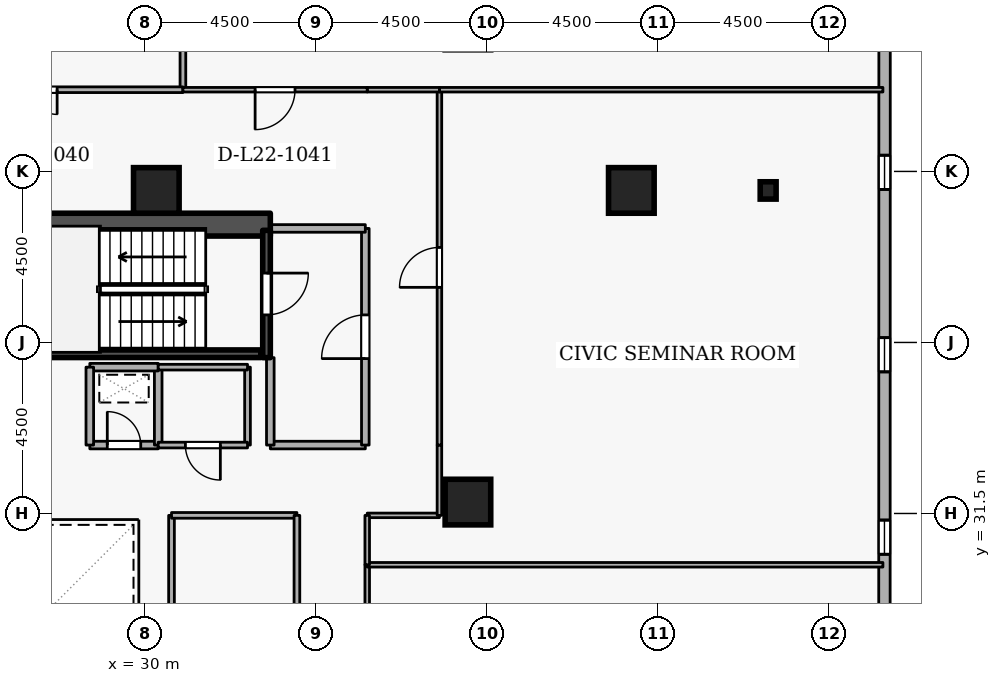
"""IFC4 building model, lengths in metres.
Left out: names, types, materials, properties, quantities, classifications, styles, units other than length and angle.
Written with IfcOpenShell. Run it as: python <this file> out.ifc"""

import sys

from ifc_helpers import new_model, si_unit, direction, frame, frame_2d, origin, origin_2d, place, context, subcontext, project, spatial, rectangle, i_section, extrude, element, fill, save


model = new_model("IFC4")
c1 = context("Model", 3, precision=1e-05, world=origin(), true_north=direction((0.0, 1.0)))
c2 = subcontext(c1, "Body", "Model", "MODEL_VIEW")
j1 = project(units=[si_unit("LENGTHUNIT", "METRE"), si_unit("PLANEANGLEUNIT", "RADIAN")], contexts=[c1])
p1 = place(None, origin())
s1 = spatial("IfcSite", under=j1, at=p1, CompositionType="ELEMENT")
p2 = place(p1, origin())
s2 = spatial("IfcBuilding", under=s1, at=p2, CompositionType="ELEMENT")
p3 = place(p2, frame((0.0, 0.0, 87.3)))
s3 = spatial("IfcBuildingStorey", under=s2, at=p3, CompositionType="ELEMENT", Elevation=87.3)
p4 = place(p3, frame((17.7, 39.1, 0.0), z_axis=(0.0, 0.0, 1.0), x_axis=(1.0, 0.0, 0.0)))
e1 = element("IfcWall", 1, at=p4, inside=s3, PredefinedType="SHEAR", context=c2, shape_type="SweptSolid", body=[
    extrude(rectangle(XDim=15.6, YDim=0.6, at=frame_2d((7.8, 0.0))), origin(), (0.0, 0.0, 1.0), 3.6),
])
for number, where, z_axis, x_axis in (
    (2, (42.8, 40.0, 0.0), (0.0, 0.0, 1.0), (1.0, 0.0, 0.0)),
    (3, (38.5, 31.8, 0.0), (0.0, 0.0, 1.0), (1.0, 0.0, 0.0)),
    (4, (30.3, 40.0, 0.0), (0.0, 0.0, 1.0), (1.0, 0.0, 0.0)),
):
    element("IfcColumn", number, at=place(p3, frame(where, z_axis=z_axis, x_axis=x_axis)), inside=s3, PredefinedType="COLUMN", context=c2, shape_type="SweptSolid", body=[
        extrude(rectangle(XDim=1.2, YDim=1.2, at=origin_2d()), origin(), (0.0, 0.0, 1.0), 3.6),
    ])
p5 = place(p3, frame((46.4, 40.0, 0.0), z_axis=(0.0, 0.0, 1.0), x_axis=(1.0, 0.0, 0.0)))
e5 = element("IfcColumn", 5, at=p5, inside=s3, PredefinedType="COLUMN", context=c2, shape_type="SweptSolid", body=[
    extrude(i_section(OverallWidth=0.418, OverallDepth=0.456, WebThickness=0.042, FlangeThickness=0.067, FilletRadius=0.015, at=origin_2d()), origin(), (0.0, 0.0, 1.0), 3.6),
])
p6 = place(p3, frame((49.456, 14.226, 0.0), z_axis=(0.0, 0.0, 1.0), x_axis=(0.000243032466, 0.999999970468, 0.0)))
e6 = element("IfcWall", 6, at=p6, inside=s3, PredefinedType="STANDARD", context=c2, shape_type="SweptSolid", body=[
    extrude(rectangle(XDim=34.155, YDim=0.3, at=frame_2d((17.078, 0.0))), origin(), (0.0, 0.0, 1.0), 2.7),
])
p7 = place(p6, frame((1.8, 0.0, 0.72)))
e7 = element("IfcOpeningElement", 7, at=p7, cuts=e6, PredefinedType="OPENING", context=c2, shape_type="SweptSolid", body=[
    extrude(rectangle(XDim=0.9, YDim=1.75, at=frame_2d((0.45, 0.875))), frame((0.0, 0.16, 0.0), z_axis=(0.0, -1.0, 0.0), x_axis=(1.0, 0.0, 0.0)), (0.0, 0.0, 1.0), 0.32),
])
p8 = place(p6, frame((6.6, 0.0, 0.72)))
e8 = element("IfcOpeningElement", 8, at=p8, cuts=e6, PredefinedType="OPENING", context=c2, shape_type="SweptSolid", body=[
    extrude(rectangle(XDim=0.9, YDim=1.75, at=frame_2d((0.45, 0.875))), frame((0.0, 0.16, 0.0), z_axis=(0.0, -1.0, 0.0), x_axis=(1.0, 0.0, 0.0)), (0.0, 0.0, 1.0), 0.32),
])
p9 = place(p6, frame((11.4, 0.0, 0.72)))
e9 = element("IfcOpeningElement", 9, at=p9, cuts=e6, PredefinedType="OPENING", context=c2, shape_type="SweptSolid", body=[
    extrude(rectangle(XDim=0.9, YDim=1.75, at=frame_2d((0.45, 0.875))), frame((0.0, 0.16, 0.0), z_axis=(0.0, -1.0, 0.0), x_axis=(1.0, 0.0, 0.0)), (0.0, 0.0, 1.0), 0.32),
])
p10 = place(p6, frame((16.2, 0.0, 0.72)))
e10 = element("IfcOpeningElement", 10, at=p10, cuts=e6, PredefinedType="OPENING", context=c2, shape_type="SweptSolid", body=[
    extrude(rectangle(XDim=0.9, YDim=1.75, at=frame_2d((0.45, 0.875))), frame((0.0, 0.16, 0.0), z_axis=(0.0, -1.0, 0.0), x_axis=(1.0, 0.0, 0.0)), (0.0, 0.0, 1.0), 0.32),
])
p11 = place(p6, frame((21.0, 0.0, 0.72)))
e11 = element("IfcOpeningElement", 11, at=p11, cuts=e6, PredefinedType="OPENING", context=c2, shape_type="SweptSolid", body=[
    extrude(rectangle(XDim=0.9, YDim=1.75, at=frame_2d((0.45, 0.875))), frame((0.0, 0.16, 0.0), z_axis=(0.0, -1.0, 0.0), x_axis=(1.0, 0.0, 0.0)), (0.0, 0.0, 1.0), 0.32),
])
p12 = place(p6, frame((25.8, 0.0, 0.72)))
e12 = element("IfcOpeningElement", 12, at=p12, cuts=e6, PredefinedType="OPENING", context=c2, shape_type="SweptSolid", body=[
    extrude(rectangle(XDim=0.9, YDim=1.75, at=frame_2d((0.45, 0.875))), frame((0.0, 0.16, 0.0), z_axis=(0.0, -1.0, 0.0), x_axis=(1.0, 0.0, 0.0)), (0.0, 0.0, 1.0), 0.32),
])
p13 = place(p6, frame((30.6, 0.0, 0.72)))
e13 = element("IfcOpeningElement", 13, at=p13, cuts=e6, PredefinedType="OPENING", context=c2, shape_type="SweptSolid", body=[
    extrude(rectangle(XDim=0.9, YDim=1.75, at=frame_2d((0.45, 0.875))), frame((0.0, 0.16, 0.0), z_axis=(0.0, -1.0, 0.0), x_axis=(1.0, 0.0, 0.0)), (0.0, 0.0, 1.0), 0.32),
])
p14 = place(p3, frame((33.2, 38.95, 0.0), z_axis=(0.0, 0.0, 1.0), x_axis=(0.0, -1.0, 0.0)))
e14 = element("IfcWall", 14, at=p14, inside=s3, PredefinedType="SHEAR", context=c2, shape_type="SweptSolid", body=[
    extrude(rectangle(XDim=3.35, YDim=0.2, at=frame_2d((1.675, 0.0))), origin(), (0.0, 0.0, 1.0), 3.6),
])
p15 = place(p14, frame((1.125, 0.0, 0.0)))
e15 = element("IfcOpeningElement", 15, at=p15, cuts=e14, PredefinedType="OPENING", context=c2, shape_type="SweptSolid", body=[
    extrude(rectangle(XDim=1.1, YDim=2.1, at=frame_2d((0.55, 1.05))), frame((0.0, 0.11, 0.0), z_axis=(0.0, -1.0, 0.0), x_axis=(1.0, 0.0, 0.0)), (0.0, 0.0, 1.0), 0.22),
])
p16 = place(p3, frame((25.95, 35.703, 0.0), z_axis=(0.0, 0.0, 1.0), x_axis=(1.0, 0.0, 0.0)))
e16 = element("IfcWall", 16, at=p16, inside=s3, PredefinedType="SHEAR", context=c2, shape_type="SweptSolid", body=[
    extrude(rectangle(XDim=7.1, YDim=0.2, at=frame_2d((3.55, 0.0))), origin(), (0.0, 0.0, 1.0), 3.6),
])
p17 = place(p3, frame((33.3, 33.3, 0.0), z_axis=(0.0, 0.0, 1.0), x_axis=(1.0, 0.0, 0.0)))
e17 = element("IfcWall", 17, at=p17, inside=s3, PredefinedType="STANDARD", context=c2, shape_type="SweptSolid", body=[
    extrude(rectangle(XDim=2.5, YDim=0.2, at=frame_2d((1.25, 0.0))), origin(), (0.0, 0.0, 1.0), 3.34),
])
p18 = place(p3, frame((35.8, 33.3, 0.0), z_axis=(0.0, 0.0, 1.0), x_axis=(0.0, 1.0, 0.0)))
e18 = element("IfcWall", 18, at=p18, inside=s3, PredefinedType="STANDARD", context=c2, shape_type="SweptSolid", body=[
    extrude(rectangle(XDim=5.7, YDim=0.2, at=frame_2d((2.85, 0.0))), origin(), (0.0, 0.0, 1.0), 3.34),
])
p19 = place(p18, frame((2.275, 0.0, 0.0)))
e19 = element("IfcOpeningElement", 19, at=p19, cuts=e18, PredefinedType="OPENING", context=c2, shape_type="SweptSolid", body=[
    extrude(rectangle(XDim=1.15, YDim=2.1, at=frame_2d((0.575, 1.05))), frame((0.0, 0.11, 0.0), z_axis=(0.0, -1.0, 0.0), x_axis=(1.0, 0.0, 0.0)), (0.0, 0.0, 1.0), 0.22),
])
p20 = place(p3, frame((35.8, 39.0, 0.0), z_axis=(0.0, 0.0, 1.0), x_axis=(-1.0, 0.0, 0.0)))
e20 = element("IfcWall", 20, at=p20, inside=s3, PredefinedType="STANDARD", context=c2, shape_type="SweptSolid", body=[
    extrude(rectangle(XDim=2.5, YDim=0.2, at=frame_2d((1.25, 0.0))), origin(), (0.0, 0.0, 1.0), 3.34),
])
p21 = place(p3, frame((33.3, 35.6, 0.0), z_axis=(0.0, 0.0, 1.0), x_axis=(0.0, -1.0, 0.0)))
e21 = element("IfcWall", 21, at=p21, inside=s3, PredefinedType="STANDARD", context=c2, shape_type="SweptSolid", body=[
    extrude(rectangle(XDim=2.3, YDim=0.2, at=frame_2d((1.15, 0.0))), origin(), (0.0, 0.0, 1.0), 2.545),
])
p22 = place(p3, frame((28.55, 33.3, 0.0), z_axis=(0.0, 0.0, 1.0), x_axis=(1.0, 0.0, 0.0)))
e22 = element("IfcWall", 22, at=p22, inside=s3, PredefinedType="STANDARD", context=c2, shape_type="SweptSolid", body=[
    extrude(rectangle(XDim=1.8, YDim=0.2, at=frame_2d((0.9, 0.0))), origin(), (0.0, 0.0, 1.0), 3.34),
])
p23 = place(p22, frame((0.46, 0.0, 0.0)))
e23 = element("IfcOpeningElement", 23, at=p23, cuts=e22, PredefinedType="OPENING", context=c2, shape_type="SweptSolid", body=[
    extrude(rectangle(XDim=0.88, YDim=2.04, at=frame_2d((0.44, 1.02))), frame((0.0, 0.11, 0.0), z_axis=(0.0, -1.0, 0.0), x_axis=(1.0, 0.0, 0.0)), (0.0, 0.0, 1.0), 0.22),
])
p24 = place(p3, frame((30.35, 33.3, 0.0), z_axis=(0.0, 0.0, 1.0), x_axis=(0.0, 1.0, 0.0)))
e24 = element("IfcWall", 24, at=p24, inside=s3, PredefinedType="STANDARD", context=c2, shape_type="SweptSolid", body=[
    extrude(rectangle(XDim=2.05, YDim=0.2, at=frame_2d((1.025, 0.0))), origin(), (0.0, 0.0, 1.0), 3.34),
])
p25 = place(p3, frame((30.35, 35.35, 0.0), z_axis=(0.0, 0.0, 1.0), x_axis=(-1.0, 0.0, 0.0)))
e25 = element("IfcWall", 25, at=p25, inside=s3, PredefinedType="STANDARD", context=c2, shape_type="SweptSolid", body=[
    extrude(rectangle(XDim=1.8, YDim=0.2, at=frame_2d((0.9, 0.0))), origin(), (0.0, 0.0, 1.0), 3.34),
])
p26 = place(p3, frame((28.55, 35.35, 0.0), z_axis=(0.0, 0.0, 1.0), x_axis=(0.0, -1.0, 0.0)))
e26 = element("IfcWall", 26, at=p26, inside=s3, PredefinedType="STANDARD", context=c2, shape_type="SweptSolid", body=[
    extrude(rectangle(XDim=2.05, YDim=0.2, at=frame_2d((1.025, 0.0))), origin(), (0.0, 0.0, 1.0), 3.34),
])
p27 = place(p3, frame((32.7, 35.35, 0.0), z_axis=(0.0, 0.0, 1.0), x_axis=(0.0, -1.0, 0.0)))
e27 = element("IfcWall", 27, at=p27, inside=s3, PredefinedType="PARTITIONING", context=c2, shape_type="SweptSolid", body=[
    extrude(rectangle(XDim=2.05, YDim=0.15, at=frame_2d((1.025, 0.0))), origin(), (0.0, 0.0, 1.0), 2.545),
])
p28 = place(p3, frame((32.7, 33.3, 0.0), z_axis=(0.0, 0.0, 1.0), x_axis=(-1.0, 0.0, 0.0)))
e28 = element("IfcWall", 28, at=p28, inside=s3, PredefinedType="PARTITIONING", context=c2, shape_type="SweptSolid", body=[
    extrude(rectangle(XDim=2.35, YDim=0.15, at=frame_2d((1.175, 0.0))), origin(), (0.0, 0.0, 1.0), 3.34),
])
p29 = place(p28, frame((0.715, 0.0, 0.0)))
e29 = element("IfcOpeningElement", 29, at=p29, cuts=e28, PredefinedType="OPENING", context=c2, shape_type="SweptSolid", body=[
    extrude(rectangle(XDim=0.92, YDim=2.08, at=frame_2d((0.46, 1.04))), frame((0.0, 0.085, 0.0), z_axis=(0.0, -1.0, 0.0), x_axis=(1.0, 0.0, 0.0)), (0.0, 0.0, 1.0), 0.17),
])
p30 = place(p3, frame((30.35, 35.35, 0.0), z_axis=(0.0, 0.0, 1.0), x_axis=(1.0, 0.0, 0.0)))
e30 = element("IfcWall", 30, at=p30, inside=s3, PredefinedType="PARTITIONING", context=c2, shape_type="SweptSolid", body=[
    extrude(rectangle(XDim=2.35, YDim=0.15, at=frame_2d((1.175, 0.0))), origin(), (0.0, 0.0, 1.0), 3.34),
])
p31 = place(p3, frame((35.85, 27.0, 0.0), z_axis=(0.0, 0.0, 1.0), x_axis=(0.0, 1.0, 0.0)))
e31 = element("IfcWall", 31, at=p31, inside=s3, PredefinedType="PARTITIONING", context=c2, shape_type="SweptSolid", body=[
    extrude(rectangle(XDim=3.15, YDim=0.12, at=frame_2d((1.575, 0.0))), origin(), (0.0, 0.0, 1.0), 3.34),
])
p32 = place(p31, frame((1.1, 0.0, 0.0)))
e32 = element("IfcOpeningElement", 32, at=p32, cuts=e31, PredefinedType="OPENING", context=c2, shape_type="SweptSolid", body=[
    extrude(rectangle(XDim=0.95, YDim=2.1, at=frame_2d((0.475, 1.05))), frame((0.0, 0.07, 0.0), z_axis=(0.0, -1.0, 0.0), x_axis=(1.0, 0.0, 0.0)), (0.0, 0.0, 1.0), 0.14),
])
p33 = place(p3, frame((35.85, 30.15, 0.0), z_axis=(0.0, 0.0, 1.0), x_axis=(1.0, 0.0, 0.0)))
e33 = element("IfcWall", 33, at=p33, inside=s3, PredefinedType="PARTITIONING", context=c2, shape_type="SweptSolid", body=[
    extrude(rectangle(XDim=13.57, YDim=0.12, at=frame_2d((6.785, 0.0))), origin(), (0.0, 0.0, 1.0), 3.34),
])
p34 = place(p3, frame((35.85, 31.45, 0.0), z_axis=(0.0, 0.0, 1.0), x_axis=(1.0, 0.0, 0.0)))
e34 = element("IfcWall", 34, at=p34, inside=s3, PredefinedType="PARTITIONING", context=c2, shape_type="SweptSolid", body=[
    extrude(rectangle(XDim=1.9, YDim=0.12, at=frame_2d((0.95, 0.0))), origin(), (0.0, 0.0, 1.0), 3.34),
])
p35 = place(p3, frame((37.75, 31.45, 0.0), z_axis=(0.0, 0.0, 1.0), x_axis=(0.0, 1.0, 0.0)))
e35 = element("IfcWall", 35, at=p35, inside=s3, PredefinedType="PARTITIONING", context=c2, shape_type="SweptSolid", body=[
    extrude(rectangle(XDim=1.85, YDim=0.12, at=frame_2d((0.925, 0.0))), origin(), (0.0, 0.0, 1.0), 3.34),
])
p36 = place(p3, frame((37.75, 33.3, 0.0), z_axis=(0.0, 0.0, 1.0), x_axis=(0.0, 1.0, 0.0)))
e36 = element("IfcWall", 36, at=p36, inside=s3, PredefinedType="PARTITIONING", context=c2, shape_type="SweptSolid", body=[
    extrude(rectangle(XDim=9.35, YDim=0.12, at=frame_2d((4.675, 0.0))), origin(), (0.0, 0.0, 1.0), 3.34),
])
p37 = place(p36, frame((4.15, 0.0, 0.0)))
e37 = element("IfcOpeningElement", 37, at=p37, cuts=e36, PredefinedType="OPENING", context=c2, shape_type="SweptSolid", body=[
    extrude(rectangle(XDim=1.05, YDim=2.1, at=frame_2d((0.525, 1.05))), frame((0.0, 0.07, 0.0), z_axis=(0.0, -1.0, 0.0), x_axis=(1.0, 0.0, 0.0)), (0.0, 0.0, 1.0), 0.14),
])
p38 = place(p3, frame((37.75, 42.65, 0.0), z_axis=(0.0, 0.0, 1.0), x_axis=(1.0, 0.0, 0.0)))
e38 = element("IfcWall", 38, at=p38, inside=s3, PredefinedType="PARTITIONING", context=c2, shape_type="SweptSolid", body=[
    extrude(rectangle(XDim=11.67, YDim=0.12, at=frame_2d((5.835, 0.0))), origin(), (0.0, 0.0, 1.0), 3.34),
])
p39 = place(p3, frame((35.85, 30.15, 0.0), z_axis=(0.0, 0.0, 1.0), x_axis=(0.0, 1.0, 0.0)))
e39 = element("IfcWall", 39, at=p39, inside=s3, PredefinedType="PARTITIONING", context=c2, shape_type="SweptSolid", body=[
    extrude(rectangle(XDim=1.3, YDim=0.12, at=frame_2d((0.65, 0.0))), origin(), (0.0, 0.0, 1.0), 3.34),
])
p40 = place(p3, frame((30.7, 22.55, 0.0), z_axis=(0.0, 0.0, 1.0), x_axis=(0.0, 1.0, 0.0)))
e40 = element("IfcWall", 40, at=p40, inside=s3, PredefinedType="PARTITIONING", context=c2, shape_type="SweptSolid", body=[
    extrude(rectangle(XDim=8.9, YDim=0.15, at=frame_2d((4.45, 0.0))), origin(), (0.0, 0.0, 1.0), 3.34),
])
p41 = place(p3, frame((30.7, 31.45, 0.0), z_axis=(0.0, 0.0, 1.0), x_axis=(1.0, 0.0, 0.0)))
e41 = element("IfcWall", 41, at=p41, inside=s3, PredefinedType="PARTITIONING", context=c2, shape_type="SweptSolid", body=[
    extrude(rectangle(XDim=3.3, YDim=0.15, at=frame_2d((1.65, 0.0))), origin(), (0.0, 0.0, 1.0), 3.34),
])
p42 = place(p3, frame((34.0, 31.45, 0.0), z_axis=(0.0, 0.0, 1.0), x_axis=(0.0, -1.0, 0.0)))
e42 = element("IfcWall", 42, at=p42, inside=s3, PredefinedType="PARTITIONING", context=c2, shape_type="SweptSolid", body=[
    extrude(rectangle(XDim=8.9, YDim=0.15, at=frame_2d((4.45, 0.0))), origin(), (0.0, 0.0, 1.0), 3.34),
])
p43 = place(p42, frame((3.8, 0.0, 0.0)))
e43 = element("IfcOpeningElement", 43, at=p43, cuts=e42, PredefinedType="OPENING", context=c2, shape_type="SweptSolid", body=[
    extrude(rectangle(XDim=1.3, YDim=2.12, at=frame_2d((0.65, 1.06))), frame((0.0, 0.085, 0.0), z_axis=(0.0, -1.0, 0.0), x_axis=(1.0, 0.0, 0.0)), (0.0, 0.0, 1.0), 0.17),
])
p44 = place(p3, frame((31.0, 50.92, 0.0), z_axis=(0.0, 0.0, 1.0), x_axis=(0.0, -1.0, 0.0)))
e44 = element("IfcWall", 44, at=p44, inside=s3, PredefinedType="PARTITIONING", context=c2, shape_type="SweptSolid", body=[
    extrude(rectangle(XDim=8.27, YDim=0.15, at=frame_2d((4.135, 0.0))), origin(), (0.0, 0.0, 1.0), 3.34),
])
p45 = place(p3, frame((31.0, 42.65, 0.0), z_axis=(0.0, 0.0, 1.0), x_axis=(-1.0, 0.0, 0.0)))
e45 = element("IfcWall", 45, at=p45, inside=s3, PredefinedType="PARTITIONING", context=c2, shape_type="SweptSolid", body=[
    extrude(rectangle(XDim=11.0, YDim=0.15, at=frame_2d((5.5, 0.0))), origin(), (0.0, 0.0, 1.0), 3.34),
])
p46 = place(p45, frame((3.31, 0.0, 0.0)))
e46 = element("IfcOpeningElement", 46, at=p46, cuts=e45, PredefinedType="OPENING", context=c2, shape_type="SweptSolid", body=[
    extrude(rectangle(XDim=1.3, YDim=2.12, at=frame_2d((0.65, 1.06))), frame((0.0, 0.085, 0.0), z_axis=(0.0, -1.0, 0.0), x_axis=(1.0, 0.0, 0.0)), (0.0, 0.0, 1.0), 0.17),
])
p47 = place(p3, frame((37.75, 42.65, 0.0), z_axis=(0.0, 0.0, 1.0), x_axis=(-1.0, 0.0, 0.0)))
e47 = element("IfcWall", 47, at=p47, inside=s3, PredefinedType="PARTITIONING", context=c2, shape_type="SweptSolid", body=[
    extrude(rectangle(XDim=1.9, YDim=0.12, at=frame_2d((0.95, 0.0))), origin(), (0.0, 0.0, 1.0), 2.895),
])
p48 = place(p3, frame((35.85, 42.65, 0.0), z_axis=(0.0, 0.0, 1.0), x_axis=(-1.0, 0.0, 0.0)))
e48 = element("IfcWall", 48, at=p48, inside=s3, PredefinedType="PARTITIONING", context=c2, shape_type="SweptSolid", body=[
    extrude(rectangle(XDim=4.85, YDim=0.12, at=frame_2d((2.425, 0.0))), origin(), (0.0, 0.0, 1.0), 2.895),
])
p49 = place(p48, frame((1.9, 0.0, 0.0)))
e49 = element("IfcOpeningElement", 49, at=p49, cuts=e48, PredefinedType="OPENING", context=c2, shape_type="SweptSolid", body=[
    extrude(rectangle(XDim=1.05, YDim=2.1, at=frame_2d((0.525, 1.05))), frame((0.0, 0.07, 0.0), z_axis=(0.0, -1.0, 0.0), x_axis=(1.0, 0.0, 0.0)), (0.0, 0.0, 1.0), 0.14),
])
p50 = place(p10, origin())
e50 = element("IfcWindow", 50, at=p50, inside=s3, PartitioningType="SINGLE_PANEL", PredefinedType="WINDOW", context=c2, shape_type="SweptSolid", body=[
    extrude(rectangle(XDim=0.9, YDim=1.75, at=frame_2d((0.45, 0.875))), frame((0.0, 0.03, 0.0), z_axis=(0.0, -1.0, 0.0), x_axis=(1.0, 0.0, 0.0)), (0.0, 0.0, 1.0), 0.06),
])
fill(e10, e50)
p51 = place(p11, origin())
e51 = element("IfcWindow", 51, at=p51, inside=s3, PartitioningType="SINGLE_PANEL", PredefinedType="WINDOW", context=c2, shape_type="SweptSolid", body=[
    extrude(rectangle(XDim=0.9, YDim=1.75, at=frame_2d((0.45, 0.875))), frame((0.0, 0.03, 0.0), z_axis=(0.0, -1.0, 0.0), x_axis=(1.0, 0.0, 0.0)), (0.0, 0.0, 1.0), 0.06),
])
fill(e11, e51)
p52 = place(p12, origin())
e52 = element("IfcWindow", 52, at=p52, inside=s3, PartitioningType="SINGLE_PANEL", PredefinedType="WINDOW", context=c2, shape_type="SweptSolid", body=[
    extrude(rectangle(XDim=0.9, YDim=1.75, at=frame_2d((0.45, 0.875))), frame((0.0, 0.03, 0.0), z_axis=(0.0, -1.0, 0.0), x_axis=(1.0, 0.0, 0.0)), (0.0, 0.0, 1.0), 0.06),
])
fill(e12, e52)
p53 = place(p15, origin())
e53 = element("IfcDoor", 53, at=p53, inside=s3, OperationType="SINGLE_SWING_LEFT", PredefinedType="DOOR", context=c2, shape_type="SweptSolid", body=[
    extrude(rectangle(XDim=1.1, YDim=2.1, at=frame_2d((0.55, 1.05))), frame((0.0, 0.025, 0.0), z_axis=(0.0, -1.0, 0.0), x_axis=(1.0, 0.0, 0.0)), (0.0, 0.0, 1.0), 0.05),
])
fill(e15, e53)
p54 = place(p19, origin())
e54 = element("IfcDoor", 54, at=p54, inside=s3, OperationType="SINGLE_SWING_LEFT", PredefinedType="DOOR", context=c2, shape_type="SweptSolid", body=[
    extrude(rectangle(XDim=1.15, YDim=2.1, at=frame_2d((0.575, 1.05))), frame((0.0, 0.025, 0.0), z_axis=(0.0, -1.0, 0.0), x_axis=(1.0, 0.0, 0.0)), (0.0, 0.0, 1.0), 0.05),
])
fill(e19, e54)
p55 = place(p23, origin())
e55 = element("IfcDoor", 55, at=p55, inside=s3, OperationType="SINGLE_SWING_LEFT", PredefinedType="DOOR", context=c2, shape_type="SweptSolid", body=[
    extrude(rectangle(XDim=0.88, YDim=2.04, at=frame_2d((0.44, 1.02))), frame((0.0, 0.025, 0.0), z_axis=(0.0, -1.0, 0.0), x_axis=(1.0, 0.0, 0.0)), (0.0, 0.0, 1.0), 0.05),
])
fill(e23, e55)
p56 = place(p29, origin())
e56 = element("IfcDoor", 56, at=p56, inside=s3, OperationType="SINGLE_SWING_LEFT", PredefinedType="DOOR", context=c2, shape_type="SweptSolid", body=[
    extrude(rectangle(XDim=0.92, YDim=2.08, at=frame_2d((0.46, 1.04))), frame((0.0, 0.025, 0.0), z_axis=(0.0, -1.0, 0.0), x_axis=(1.0, 0.0, 0.0)), (0.0, 0.0, 1.0), 0.05),
])
fill(e29, e56)
p57 = place(p37, origin())
e57 = element("IfcDoor", 57, at=p57, inside=s3, OperationType="SINGLE_SWING_LEFT", PredefinedType="DOOR", context=c2, shape_type="SweptSolid", body=[
    extrude(rectangle(XDim=1.05, YDim=2.1, at=frame_2d((0.525, 1.05))), frame((0.0, 0.025, 0.0), z_axis=(0.0, -1.0, 0.0), x_axis=(1.0, 0.0, 0.0)), (0.0, 0.0, 1.0), 0.05),
])
fill(e37, e57)
p58 = place(p46, origin())
e58 = element("IfcDoor", 58, at=p58, inside=s3, OperationType="DOUBLE_DOOR_SINGLE_SWING", PredefinedType="DOOR", context=c2, shape_type="SweptSolid", body=[
    extrude(rectangle(XDim=1.3, YDim=2.12, at=frame_2d((0.65, 1.06))), frame((0.0, 0.025, 0.0), z_axis=(0.0, -1.0, 0.0), x_axis=(1.0, 0.0, 0.0)), (0.0, 0.0, 1.0), 0.05),
])
fill(e46, e58)
p59 = place(p49, origin())
e59 = element("IfcDoor", 59, at=p59, inside=s3, OperationType="SINGLE_SWING_RIGHT", PredefinedType="DOOR", context=c2, shape_type="SweptSolid", body=[
    extrude(rectangle(XDim=1.05, YDim=2.1, at=frame_2d((0.525, 1.05))), frame((0.0, 0.025, 0.0), z_axis=(0.0, -1.0, 0.0), x_axis=(1.0, 0.0, 0.0)), (0.0, 0.0, 1.0), 0.05),
])
fill(e49, e59)
save(model, sys.argv[1])
